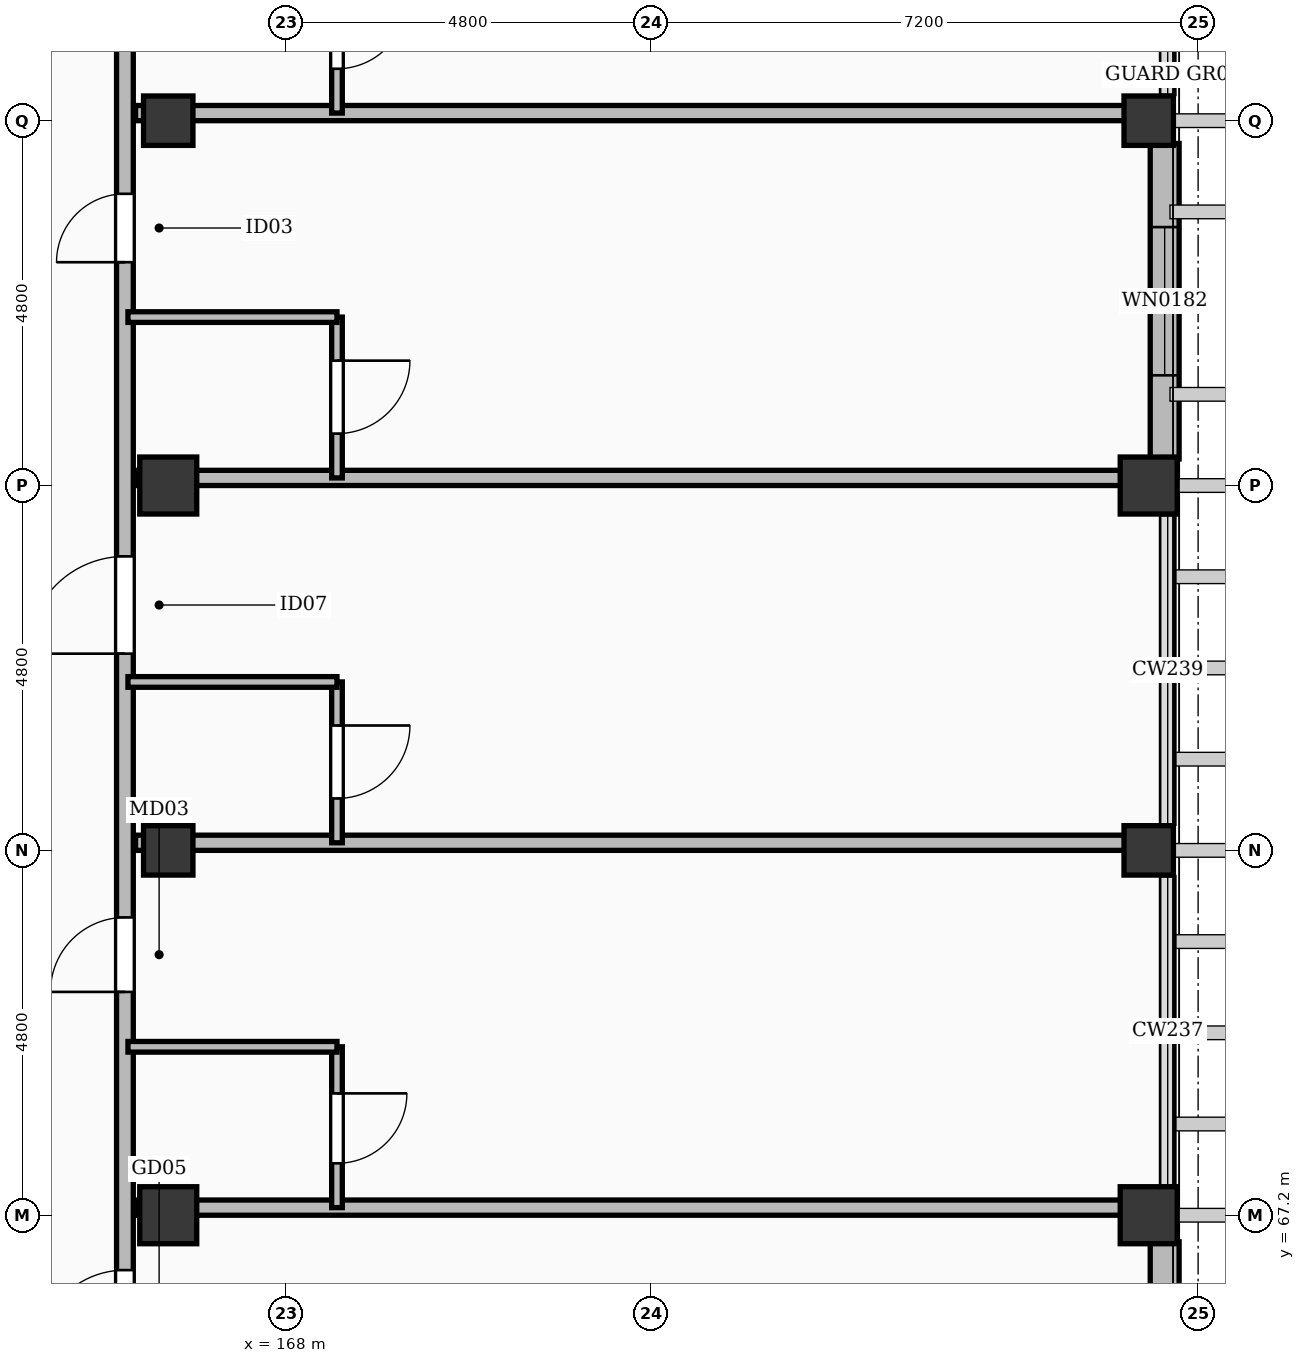
"""IFC4 building model, lengths in metres.
Left out: names, types, materials, properties, quantities, classifications, styles, units other than length and angle.
Written with IfcOpenShell. Run it as: python <this file> out.ifc"""

import sys

from ifc_helpers import new_model, si_unit, direction, frame, frame_2d, origin, origin_2d, place, context, subcontext, project, spatial, rectangle, extrude, element, fill, save


model = new_model("IFC4")
c1 = context("Model", 3, precision=1e-05, world=origin(), true_north=direction((0.0, 1.0)))
c2 = subcontext(c1, "Body", "Model", "MODEL_VIEW")
j1 = project(units=[si_unit("LENGTHUNIT", "METRE"), si_unit("PLANEANGLEUNIT", "RADIAN")], contexts=[c1])
p1 = place(None, origin())
s1 = spatial("IfcSite", under=j1, at=p1, CompositionType="ELEMENT")
p2 = place(p1, origin())
s2 = spatial("IfcBuilding", under=s1, at=p2, CompositionType="ELEMENT")
p3 = place(p2, frame((0.0, 0.0, 28.2)))
s3 = spatial("IfcBuildingStorey", under=s2, at=p3, CompositionType="ELEMENT", Elevation=28.2)
for number, where, z_axis, x_axis in (
    (1, (166.45, 67.2, 0.0), (0.0, 0.0, 1.0), (1.0, 0.0, 0.0)),
    (2, (166.45, 76.8, 0.0), (0.0, 0.0, 1.0), (1.0, 0.0, 0.0)),
    (3, (179.35, 67.2, 0.0), (0.0, 0.0, 1.0), (1.0, 0.0, 0.0)),
    (4, (179.35, 76.8, 0.0), (0.0, 0.0, 1.0), (1.0, 0.0, 0.0)),
):
    element("IfcColumn", number, at=place(p3, frame(where, z_axis=z_axis, x_axis=x_axis)), inside=s3, PredefinedType="COLUMN", context=c2, shape_type="SweptSolid", body=[
        extrude(rectangle(XDim=0.75, YDim=0.75, at=origin_2d()), origin(), (0.0, 0.0, 1.0), 3.6),
    ])
for number, where, z_axis, x_axis in (
    (5, (166.45, 72.0, 0.0), (0.0, 0.0, 1.0), (1.0, 0.0, 0.0)),
    (6, (166.45, 81.6, 0.0), (0.0, 0.0, 1.0), (1.0, 0.0, 0.0)),
    (7, (179.35, 72.0, 0.0), (0.0, 0.0, 1.0), (1.0, 0.0, 0.0)),
    (8, (179.35, 81.6, 0.0), (0.0, 0.0, 1.0), (1.0, 0.0, 0.0)),
):
    element("IfcColumn", number, at=place(p3, frame(where, z_axis=z_axis, x_axis=x_axis)), inside=s3, PredefinedType="COLUMN", context=c2, shape_type="SweptSolid", body=[
        extrude(rectangle(XDim=0.65, YDim=0.65, at=origin_2d()), origin(), (0.0, 0.0, 1.0), 3.6),
    ])
p4 = place(p3, frame((179.56, 66.85, 0.0), z_axis=(0.0, 0.0, 1.0), x_axis=(0.0, -1.0, 0.0)))
e9 = element("IfcWall", 9, at=p4, inside=s3, PredefinedType="SOLIDWALL", context=c2, shape_type="SweptSolid", body=[
    extrude(rectangle(XDim=4.15, YDim=0.38, at=frame_2d((2.075, 0.0))), origin(), (0.0, 0.0, 1.0), 2.582),
])
p5 = place(p4, frame((0.875, 0.0, 0.55)))
e10 = element("IfcOpeningElement", 10, at=p5, cuts=e9, PredefinedType="OPENING", context=c2, shape_type="SweptSolid", body=[
    extrude(rectangle(XDim=2.4, YDim=1.8, at=frame_2d((1.2, 0.9))), frame((0.0, 0.202, 0.0), z_axis=(0.0, -1.0, 0.0), x_axis=(1.0, 0.0, 0.0)), (0.0, 0.0, 1.0), 0.404),
])
p6 = place(p3, frame((179.56, 81.3, 0.0), z_axis=(0.0, 0.0, 1.0), x_axis=(0.0, -1.0, 0.0)))
e11 = element("IfcWall", 11, at=p6, inside=s3, PredefinedType="SOLIDWALL", context=c2, shape_type="SweptSolid", body=[
    extrude(rectangle(XDim=4.15, YDim=0.38, at=frame_2d((2.075, 0.0))), origin(), (0.0, 0.0, 1.0), 2.582),
])
p7 = place(p6, frame((1.1, 0.0, 0.55)))
e12 = element("IfcOpeningElement", 12, at=p7, cuts=e11, PredefinedType="OPENING", context=c2, shape_type="SweptSolid", body=[
    extrude(rectangle(XDim=1.95, YDim=1.77, at=frame_2d((0.975, 0.885))), frame((0.0, 0.202, 0.0), z_axis=(0.0, -1.0, 0.0), x_axis=(1.0, 0.0, 0.0)), (0.0, 0.0, 1.0), 0.404),
])
p8 = place(p3, frame((165.88, 38.75, 0.0), z_axis=(0.0, 0.0, 1.0), x_axis=(0.0, 1.0, 0.0)))
e13 = element("IfcWall", 13, at=p8, inside=s3, PredefinedType="PARTITIONING", context=c2, shape_type="SweptSolid", body=[
    extrude(rectangle(XDim=86.9, YDim=0.22, at=frame_2d((43.45, 0.0))), origin(), (0.0, 0.0, 1.0), 2.582),
])
p9 = place(p8, frame((0.691, 0.0, 0.0)))
e14 = element("IfcOpeningElement", 14, at=p9, cuts=e13, PredefinedType="OPENING", context=c2, shape_type="SweptSolid", body=[
    extrude(rectangle(XDim=0.98, YDim=2.15, at=frame_2d((0.49, 1.075))), frame((0.0, 0.122, 0.0), z_axis=(0.0, -1.0, 0.0), x_axis=(1.0, 0.0, 0.0)), (0.0, 0.0, 1.0), 0.244),
])
p10 = place(p8, frame((7.038, 0.0, 0.0)))
e15 = element("IfcOpeningElement", 15, at=p10, cuts=e13, PredefinedType="OPENING", context=c2, shape_type="SweptSolid", body=[
    extrude(rectangle(XDim=1.28, YDim=2.16, at=frame_2d((0.64, 1.08))), frame((0.0, 0.122, 0.0), z_axis=(0.0, -1.0, 0.0), x_axis=(1.0, 0.0, 0.0)), (0.0, 0.0, 1.0), 0.244),
])
p11 = place(p8, frame((12.188, 0.0, 0.0)))
e16 = element("IfcOpeningElement", 16, at=p11, cuts=e13, PredefinedType="OPENING", context=c2, shape_type="SweptSolid", body=[
    extrude(rectangle(XDim=0.9, YDim=2.08, at=frame_2d((0.45, 1.04))), frame((0.0, 0.122, 0.0), z_axis=(0.0, -1.0, 0.0), x_axis=(1.0, 0.0, 0.0)), (0.0, 0.0, 1.0), 0.244),
])
p12 = place(p8, frame((16.988, 0.0, 0.0)))
e17 = element("IfcOpeningElement", 17, at=p12, cuts=e13, PredefinedType="OPENING", context=c2, shape_type="SweptSolid", body=[
    extrude(rectangle(XDim=1.05, YDim=2.22, at=frame_2d((0.525, 1.11))), frame((0.0, 0.122, 0.0), z_axis=(0.0, -1.0, 0.0), x_axis=(1.0, 0.0, 0.0)), (0.0, 0.0, 1.0), 0.244),
])
p13 = place(p8, frame((21.788, 0.0, 0.0)))
e18 = element("IfcOpeningElement", 18, at=p13, cuts=e13, PredefinedType="OPENING", context=c2, shape_type="SweptSolid", body=[
    extrude(rectangle(XDim=1.02, YDim=2.2, at=frame_2d((0.51, 1.1))), frame((0.0, 0.122, 0.0), z_axis=(0.0, -1.0, 0.0), x_axis=(1.0, 0.0, 0.0)), (0.0, 0.0, 1.0), 0.244),
])
p14 = place(p8, frame((26.588, 0.0, 0.0)))
e19 = element("IfcOpeningElement", 19, at=p14, cuts=e13, PredefinedType="OPENING", context=c2, shape_type="SweptSolid", body=[
    extrude(rectangle(XDim=1.14, YDim=2.26, at=frame_2d((0.57, 1.13))), frame((0.0, 0.122, 0.0), z_axis=(0.0, -1.0, 0.0), x_axis=(1.0, 0.0, 0.0)), (0.0, 0.0, 1.0), 0.244),
])
p15 = place(p8, frame((31.388, 0.0, 0.0)))
e20 = element("IfcOpeningElement", 20, at=p15, cuts=e13, PredefinedType="OPENING", context=c2, shape_type="SweptSolid", body=[
    extrude(rectangle(XDim=0.98, YDim=2.15, at=frame_2d((0.49, 1.075))), frame((0.0, 0.122, 0.0), z_axis=(0.0, -1.0, 0.0), x_axis=(1.0, 0.0, 0.0)), (0.0, 0.0, 1.0), 0.244),
])
p16 = place(p8, frame((35.838, 0.0, 0.0)))
e21 = element("IfcOpeningElement", 21, at=p16, cuts=e13, PredefinedType="OPENING", context=c2, shape_type="SweptSolid", body=[
    extrude(rectangle(XDim=1.28, YDim=2.16, at=frame_2d((0.64, 1.08))), frame((0.0, 0.122, 0.0), z_axis=(0.0, -1.0, 0.0), x_axis=(1.0, 0.0, 0.0)), (0.0, 0.0, 1.0), 0.244),
])
p17 = place(p8, frame((40.988, 0.0, 0.0)))
e22 = element("IfcOpeningElement", 22, at=p17, cuts=e13, PredefinedType="OPENING", context=c2, shape_type="SweptSolid", body=[
    extrude(rectangle(XDim=0.9, YDim=2.08, at=frame_2d((0.45, 1.04))), frame((0.0, 0.122, 0.0), z_axis=(0.0, -1.0, 0.0), x_axis=(1.0, 0.0, 0.0)), (0.0, 0.0, 1.0), 0.244),
])
p18 = place(p8, frame((45.788, 0.0, 0.0)))
e23 = element("IfcOpeningElement", 23, at=p18, cuts=e13, PredefinedType="OPENING", context=c2, shape_type="SweptSolid", body=[
    extrude(rectangle(XDim=1.05, YDim=2.22, at=frame_2d((0.525, 1.11))), frame((0.0, 0.122, 0.0), z_axis=(0.0, -1.0, 0.0), x_axis=(1.0, 0.0, 0.0)), (0.0, 0.0, 1.0), 0.244),
])
p19 = place(p8, frame((50.588, 0.0, 0.0)))
e24 = element("IfcOpeningElement", 24, at=p19, cuts=e13, PredefinedType="OPENING", context=c2, shape_type="SweptSolid", body=[
    extrude(rectangle(XDim=1.02, YDim=2.2, at=frame_2d((0.51, 1.1))), frame((0.0, 0.122, 0.0), z_axis=(0.0, -1.0, 0.0), x_axis=(1.0, 0.0, 0.0)), (0.0, 0.0, 1.0), 0.244),
])
p20 = place(p8, frame((55.388, 0.0, 0.0)))
e25 = element("IfcOpeningElement", 25, at=p20, cuts=e13, PredefinedType="OPENING", context=c2, shape_type="SweptSolid", body=[
    extrude(rectangle(XDim=1.14, YDim=2.26, at=frame_2d((0.57, 1.13))), frame((0.0, 0.122, 0.0), z_axis=(0.0, -1.0, 0.0), x_axis=(1.0, 0.0, 0.0)), (0.0, 0.0, 1.0), 0.244),
])
p21 = place(p8, frame((60.188, 0.0, 0.0)))
e26 = element("IfcOpeningElement", 26, at=p21, cuts=e13, PredefinedType="OPENING", context=c2, shape_type="SweptSolid", body=[
    extrude(rectangle(XDim=0.98, YDim=2.15, at=frame_2d((0.49, 1.075))), frame((0.0, 0.122, 0.0), z_axis=(0.0, -1.0, 0.0), x_axis=(1.0, 0.0, 0.0)), (0.0, 0.0, 1.0), 0.244),
])
p22 = place(p8, frame((64.638, 0.0, 0.0)))
e27 = element("IfcOpeningElement", 27, at=p22, cuts=e13, PredefinedType="OPENING", context=c2, shape_type="SweptSolid", body=[
    extrude(rectangle(XDim=1.28, YDim=2.16, at=frame_2d((0.64, 1.08))), frame((0.0, 0.122, 0.0), z_axis=(0.0, -1.0, 0.0), x_axis=(1.0, 0.0, 0.0)), (0.0, 0.0, 1.0), 0.244),
])
p23 = place(p8, frame((69.788, 0.0, 0.0)))
e28 = element("IfcOpeningElement", 28, at=p23, cuts=e13, PredefinedType="OPENING", context=c2, shape_type="SweptSolid", body=[
    extrude(rectangle(XDim=0.9, YDim=2.08, at=frame_2d((0.45, 1.04))), frame((0.0, 0.122, 0.0), z_axis=(0.0, -1.0, 0.0), x_axis=(1.0, 0.0, 0.0)), (0.0, 0.0, 1.0), 0.244),
])
p24 = place(p8, frame((74.588, 0.0, 0.0)))
e29 = element("IfcOpeningElement", 29, at=p24, cuts=e13, PredefinedType="OPENING", context=c2, shape_type="SweptSolid", body=[
    extrude(rectangle(XDim=1.05, YDim=2.22, at=frame_2d((0.525, 1.11))), frame((0.0, 0.122, 0.0), z_axis=(0.0, -1.0, 0.0), x_axis=(1.0, 0.0, 0.0)), (0.0, 0.0, 1.0), 0.244),
])
p25 = place(p8, frame((79.388, 0.0, 0.0)))
e30 = element("IfcOpeningElement", 30, at=p25, cuts=e13, PredefinedType="OPENING", context=c2, shape_type="SweptSolid", body=[
    extrude(rectangle(XDim=1.02, YDim=2.2, at=frame_2d((0.51, 1.1))), frame((0.0, 0.122, 0.0), z_axis=(0.0, -1.0, 0.0), x_axis=(1.0, 0.0, 0.0)), (0.0, 0.0, 1.0), 0.244),
])
p26 = place(p8, frame((84.188, 0.0, 0.0)))
e31 = element("IfcOpeningElement", 31, at=p26, cuts=e13, PredefinedType="OPENING", context=c2, shape_type="SweptSolid", body=[
    extrude(rectangle(XDim=1.14, YDim=2.26, at=frame_2d((0.57, 1.13))), frame((0.0, 0.122, 0.0), z_axis=(0.0, -1.0, 0.0), x_axis=(1.0, 0.0, 0.0)), (0.0, 0.0, 1.0), 0.244),
])
p27 = place(p3, frame((166.02, 67.3, 0.0), z_axis=(0.0, 0.0, 1.0), x_axis=(1.0, 0.0, 0.0)))
e32 = element("IfcWall", 32, at=p27, inside=s3, PredefinedType="PARTITIONING", context=c2, shape_type="SweptSolid", body=[
    extrude(rectangle(XDim=13.23, YDim=0.2, at=frame_2d((6.615, 0.0))), origin(), (0.0, 0.0, 1.0), 2.582),
])
p28 = place(p3, frame((168.67, 67.3, 0.0), z_axis=(0.0, 0.0, 1.0), x_axis=(0.0, 1.0, 0.0)))
e33 = element("IfcWall", 33, at=p28, inside=s3, PredefinedType="PARTITIONING", context=c2, shape_type="SweptSolid", body=[
    extrude(rectangle(XDim=2.116, YDim=0.14, at=frame_2d((1.058, 0.0))), origin(), (0.0, 0.0, 1.0), 2.682),
])
p29 = place(p28, frame((0.583, 0.0, 0.0)))
e34 = element("IfcOpeningElement", 34, at=p29, cuts=e33, PredefinedType="OPENING", context=c2, shape_type="SweptSolid", body=[
    extrude(rectangle(XDim=0.92, YDim=2.1, at=frame_2d((0.46, 1.05))), frame((0.0, 0.082, 0.0), z_axis=(0.0, -1.0, 0.0), x_axis=(1.0, 0.0, 0.0)), (0.0, 0.0, 1.0), 0.164),
])
p30 = place(p3, frame((165.92, 69.416, 0.0), z_axis=(0.0, 0.0, 1.0), x_axis=(1.0, 0.0, 0.0)))
e35 = element("IfcWall", 35, at=p30, inside=s3, PredefinedType="PARTITIONING", context=c2, shape_type="SweptSolid", body=[
    extrude(rectangle(XDim=2.75, YDim=0.14, at=frame_2d((1.375, 0.0))), origin(), (0.0, 0.0, 1.0), 2.682),
])
p31 = place(p3, frame((166.02, 72.1, 0.0), z_axis=(0.0, 0.0, 1.0), x_axis=(1.0, 0.0, 0.0)))
e36 = element("IfcWall", 36, at=p31, inside=s3, PredefinedType="PARTITIONING", context=c2, shape_type="SweptSolid", body=[
    extrude(rectangle(XDim=13.23, YDim=0.2, at=frame_2d((6.615, 0.0))), origin(), (0.0, 0.0, 1.0), 2.582),
])
p32 = place(p3, frame((168.67, 72.1, 0.0), z_axis=(0.0, 0.0, 1.0), x_axis=(0.0, 1.0, 0.0)))
e37 = element("IfcWall", 37, at=p32, inside=s3, PredefinedType="PARTITIONING", context=c2, shape_type="SweptSolid", body=[
    extrude(rectangle(XDim=2.116, YDim=0.14, at=frame_2d((1.058, 0.0))), origin(), (0.0, 0.0, 1.0), 2.682),
])
p33 = place(p32, frame((0.583, 0.0, 0.0)))
e38 = element("IfcOpeningElement", 38, at=p33, cuts=e37, PredefinedType="OPENING", context=c2, shape_type="SweptSolid", body=[
    extrude(rectangle(XDim=0.96, YDim=2.12, at=frame_2d((0.48, 1.06))), frame((0.0, 0.082, 0.0), z_axis=(0.0, -1.0, 0.0), x_axis=(1.0, 0.0, 0.0)), (0.0, 0.0, 1.0), 0.164),
])
p34 = place(p3, frame((165.92, 74.216, 0.0), z_axis=(0.0, 0.0, 1.0), x_axis=(1.0, 0.0, 0.0)))
e39 = element("IfcWall", 39, at=p34, inside=s3, PredefinedType="PARTITIONING", context=c2, shape_type="SweptSolid", body=[
    extrude(rectangle(XDim=2.75, YDim=0.14, at=frame_2d((1.375, 0.0))), origin(), (0.0, 0.0, 1.0), 2.682),
])
p35 = place(p3, frame((166.02, 76.9, 0.0), z_axis=(0.0, 0.0, 1.0), x_axis=(1.0, 0.0, 0.0)))
e40 = element("IfcWall", 40, at=p35, inside=s3, PredefinedType="PARTITIONING", context=c2, shape_type="SweptSolid", body=[
    extrude(rectangle(XDim=13.23, YDim=0.2, at=frame_2d((6.615, 0.0))), origin(), (0.0, 0.0, 1.0), 2.582),
])
p36 = place(p3, frame((168.67, 76.9, 0.0), z_axis=(0.0, 0.0, 1.0), x_axis=(0.0, 1.0, 0.0)))
e41 = element("IfcWall", 41, at=p36, inside=s3, PredefinedType="PARTITIONING", context=c2, shape_type="SweptSolid", body=[
    extrude(rectangle(XDim=2.116, YDim=0.14, at=frame_2d((1.058, 0.0))), origin(), (0.0, 0.0, 1.0), 2.682),
])
p37 = place(p36, frame((0.583, 0.0, 0.0)))
e42 = element("IfcOpeningElement", 42, at=p37, cuts=e41, PredefinedType="OPENING", context=c2, shape_type="SweptSolid", body=[
    extrude(rectangle(XDim=0.96, YDim=2.12, at=frame_2d((0.48, 1.06))), frame((0.0, 0.082, 0.0), z_axis=(0.0, -1.0, 0.0), x_axis=(1.0, 0.0, 0.0)), (0.0, 0.0, 1.0), 0.164),
])
p38 = place(p3, frame((165.92, 79.016, 0.0), z_axis=(0.0, 0.0, 1.0), x_axis=(1.0, 0.0, 0.0)))
e43 = element("IfcWall", 43, at=p38, inside=s3, PredefinedType="PARTITIONING", context=c2, shape_type="SweptSolid", body=[
    extrude(rectangle(XDim=2.75, YDim=0.14, at=frame_2d((1.375, 0.0))), origin(), (0.0, 0.0, 1.0), 2.682),
])
p39 = place(p3, frame((166.02, 81.7, 0.0), z_axis=(0.0, 0.0, 1.0), x_axis=(1.0, 0.0, 0.0)))
e44 = element("IfcWall", 44, at=p39, inside=s3, PredefinedType="PARTITIONING", context=c2, shape_type="SweptSolid", body=[
    extrude(rectangle(XDim=13.23, YDim=0.2, at=frame_2d((6.615, 0.0))), origin(), (0.0, 0.0, 1.0), 2.582),
])
p40 = place(p3, frame((168.67, 81.7, 0.0), z_axis=(0.0, 0.0, 1.0), x_axis=(0.0, 1.0, 0.0)))
e45 = element("IfcWall", 45, at=p40, inside=s3, PredefinedType="PARTITIONING", context=c2, shape_type="SweptSolid", body=[
    extrude(rectangle(XDim=2.116, YDim=0.14, at=frame_2d((1.058, 0.0))), origin(), (0.0, 0.0, 1.0), 2.682),
])
p41 = place(p40, frame((0.583, 0.0, 0.0)))
e46 = element("IfcOpeningElement", 46, at=p41, cuts=e45, PredefinedType="OPENING", context=c2, shape_type="SweptSolid", body=[
    extrude(rectangle(XDim=0.92, YDim=2.1, at=frame_2d((0.46, 1.05))), frame((0.0, 0.082, 0.0), z_axis=(0.0, -1.0, 0.0), x_axis=(1.0, 0.0, 0.0)), (0.0, 0.0, 1.0), 0.164),
])
p42 = place(p7, origin())
e47 = element("IfcWindow", 47, at=p42, inside=s3, PartitioningType="SINGLE_PANEL", PredefinedType="WINDOW", context=c2, shape_type="SweptSolid", body=[
    extrude(rectangle(XDim=1.95, YDim=1.77, at=frame_2d((0.975, 0.885))), frame((0.0, 0.03, 0.0), z_axis=(0.0, -1.0, 0.0), x_axis=(1.0, 0.0, 0.0)), (0.0, 0.0, 1.0), 0.06),
])
fill(e12, e47)
p43 = place(p14, origin())
e48 = element("IfcDoor", 48, at=p43, inside=s3, OperationType="SINGLE_SWING_LEFT", PredefinedType="DOOR", context=c2, shape_type="SweptSolid", body=[
    extrude(rectangle(XDim=1.14, YDim=2.26, at=frame_2d((0.57, 1.13))), frame((0.0, 0.025, 0.0), z_axis=(0.0, -1.0, 0.0), x_axis=(1.0, 0.0, 0.0)), (0.0, 0.0, 1.0), 0.05),
])
fill(e19, e48)
p44 = place(p15, origin())
e49 = element("IfcDoor", 49, at=p44, inside=s3, OperationType="SINGLE_SWING_LEFT", PredefinedType="DOOR", context=c2, shape_type="SweptSolid", body=[
    extrude(rectangle(XDim=0.98, YDim=2.15, at=frame_2d((0.49, 1.075))), frame((0.0, 0.025, 0.0), z_axis=(0.0, -1.0, 0.0), x_axis=(1.0, 0.0, 0.0)), (0.0, 0.0, 1.0), 0.05),
])
fill(e20, e49)
p45 = place(p29, frame((0.92, 0.0, 0.0), z_axis=(0.0, 0.0, 1.0), x_axis=(-1.0, 0.0, 0.0)))
e50 = element("IfcDoor", 50, at=p45, inside=s3, OperationType="SINGLE_SWING_RIGHT", PredefinedType="DOOR", context=c2, shape_type="SweptSolid", body=[
    extrude(rectangle(XDim=0.92, YDim=2.1, at=frame_2d((0.46, 1.05))), frame((0.0, 0.025, 0.0), z_axis=(0.0, -1.0, 0.0), x_axis=(1.0, 0.0, 0.0)), (0.0, 0.0, 1.0), 0.05),
])
fill(e34, e50)
p46 = place(p16, origin())
e51 = element("IfcDoor", 51, at=p46, inside=s3, OperationType="SINGLE_SWING_LEFT", PredefinedType="DOOR", context=c2, shape_type="SweptSolid", body=[
    extrude(rectangle(XDim=1.28, YDim=2.16, at=frame_2d((0.64, 1.08))), frame((0.0, 0.025, 0.0), z_axis=(0.0, -1.0, 0.0), x_axis=(1.0, 0.0, 0.0)), (0.0, 0.0, 1.0), 0.05),
])
fill(e21, e51)
p47 = place(p33, frame((0.96, 0.0, 0.0), z_axis=(0.0, 0.0, 1.0), x_axis=(-1.0, 0.0, 0.0)))
e52 = element("IfcDoor", 52, at=p47, inside=s3, OperationType="SINGLE_SWING_RIGHT", PredefinedType="DOOR", context=c2, shape_type="SweptSolid", body=[
    extrude(rectangle(XDim=0.96, YDim=2.12, at=frame_2d((0.48, 1.06))), frame((0.0, 0.025, 0.0), z_axis=(0.0, -1.0, 0.0), x_axis=(1.0, 0.0, 0.0)), (0.0, 0.0, 1.0), 0.05),
])
fill(e38, e52)
p48 = place(p17, origin())
e53 = element("IfcDoor", 53, at=p48, inside=s3, OperationType="SINGLE_SWING_LEFT", PredefinedType="DOOR", context=c2, shape_type="SweptSolid", body=[
    extrude(rectangle(XDim=0.9, YDim=2.08, at=frame_2d((0.45, 1.04))), frame((0.0, 0.025, 0.0), z_axis=(0.0, -1.0, 0.0), x_axis=(1.0, 0.0, 0.0)), (0.0, 0.0, 1.0), 0.05),
])
fill(e22, e53)
p49 = place(p37, frame((0.96, 0.0, 0.0), z_axis=(0.0, 0.0, 1.0), x_axis=(-1.0, 0.0, 0.0)))
e54 = element("IfcDoor", 54, at=p49, inside=s3, OperationType="SINGLE_SWING_RIGHT", PredefinedType="DOOR", context=c2, shape_type="SweptSolid", body=[
    extrude(rectangle(XDim=0.96, YDim=2.12, at=frame_2d((0.48, 1.06))), frame((0.0, 0.025, 0.0), z_axis=(0.0, -1.0, 0.0), x_axis=(1.0, 0.0, 0.0)), (0.0, 0.0, 1.0), 0.05),
])
fill(e42, e54)
p50 = place(p41, frame((0.92, 0.0, 0.0), z_axis=(0.0, 0.0, 1.0), x_axis=(-1.0, 0.0, 0.0)))
e55 = element("IfcDoor", 55, at=p50, inside=s3, OperationType="SINGLE_SWING_RIGHT", PredefinedType="DOOR", context=c2, shape_type="SweptSolid", body=[
    extrude(rectangle(XDim=0.92, YDim=2.1, at=frame_2d((0.46, 1.05))), frame((0.0, 0.025, 0.0), z_axis=(0.0, -1.0, 0.0), x_axis=(1.0, 0.0, 0.0)), (0.0, 0.0, 1.0), 0.05),
])
fill(e46, e55)
save(model, sys.argv[1])
